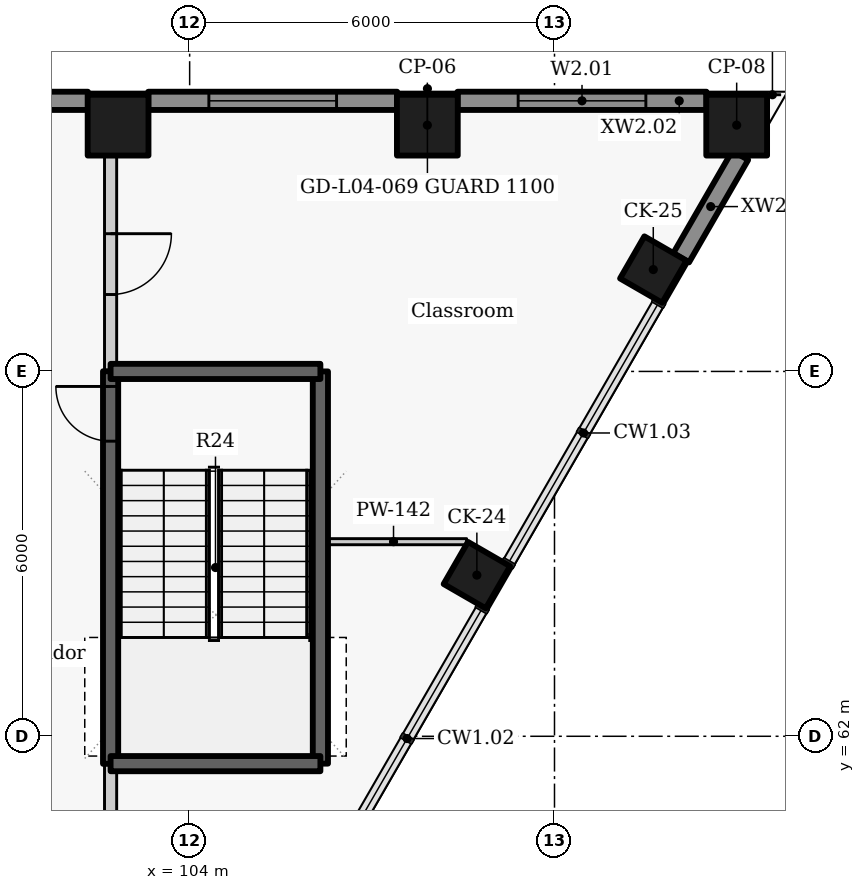
"""IFC4 building model, lengths in metres.
Left out: names, types, materials, properties, quantities, classifications, styles, units other than length and angle.
Written with IfcOpenShell. Run it as: python <this file> out.ifc"""

import sys

from ifc_helpers import new_model, si_unit, direction, frame, frame_2d, origin, origin_2d, place, context, subcontext, project, spatial, rectangle, extrude, element, fill, save


model = new_model("IFC4")
c1 = context("Model", 3, precision=1e-05, world=origin(), true_north=direction((0.0, 1.0)))
c2 = subcontext(c1, "Body", "Model", "MODEL_VIEW")
j1 = project(units=[si_unit("LENGTHUNIT", "METRE"), si_unit("PLANEANGLEUNIT", "RADIAN")], contexts=[c1])
p1 = place(None, origin())
s1 = spatial("IfcSite", under=j1, at=p1, CompositionType="ELEMENT")
p2 = place(p1, origin())
s2 = spatial("IfcBuilding", under=s1, at=p2, CompositionType="ELEMENT")
p3 = place(p2, frame((0.0, 0.0, 19.8)))
s3 = spatial("IfcBuildingStorey", under=s2, at=p3, CompositionType="ELEMENT", Elevation=19.8)
for number, where, z_axis, x_axis in (
    (1, (108.723, 64.65, 0.0), (0.0, 0.0, 1.0), (0.5, 0.866, 0.0)),
    (2, (111.625, 69.675, 0.0), (0.0, 0.0, 1.0), (0.5, 0.866, 0.0)),
):
    element("IfcColumn", number, at=place(p3, frame(where, z_axis=z_axis, x_axis=x_axis)), inside=s3, PredefinedType="COLUMN", context=c2, shape_type="SweptSolid", body=[
        extrude(rectangle(XDim=0.8, YDim=0.8, at=origin_2d()), origin(), (0.0, 0.0, 1.0), 4.2),
    ])
for number, where, z_axis, x_axis in (
    (3, (102.823, 72.05, 0.0), (0.0, 0.0, 1.0), (1.0, 0.0, 0.0)),
    (4, (107.909, 72.05, 0.0), (0.0, 0.0, 1.0), (1.0, 0.0, 0.0)),
    (5, (112.996, 72.05, 0.0), (0.0, 0.0, 1.0), (1.0, 0.0, 0.0)),
):
    element("IfcColumn", number, at=place(p3, frame(where, z_axis=z_axis, x_axis=x_axis)), inside=s3, PredefinedType="COLUMN", context=c2, shape_type="SweptSolid", body=[
        extrude(rectangle(XDim=1.0, YDim=1.0, at=origin_2d()), origin(), (0.0, 0.0, 1.0), 4.2),
    ])
p4 = place(p3, frame((112.082, 69.868, 0.0), z_axis=(0.0, 0.0, 1.0), x_axis=(0.500051850797, 0.865995465643, 0.0)))
e6 = element("IfcWall", 6, at=p4, inside=s3, PredefinedType="SOLIDWALL", context=c2, shape_type="SweptSolid", body=[
    extrude(rectangle(XDim=1.946, YDim=0.3, at=frame_2d((0.973, 0.0))), origin(), (0.0, 0.0, 1.0), 3.0),
])
p5 = place(p3, frame((112.5, 72.45, 0.0), z_axis=(0.0, 0.0, 1.0), x_axis=(-1.0, 0.0, 0.0)))
e7 = element("IfcWall", 7, at=p5, inside=s3, PredefinedType="SOLIDWALL", context=c2, shape_type="SweptSolid", body=[
    extrude(rectangle(XDim=4.095, YDim=0.3, at=frame_2d((2.047, 0.0))), origin(), (0.0, 0.0, 1.0), 3.0),
])
p6 = place(p5, frame((0.998, 0.0, 0.9)))
e8 = element("IfcOpeningElement", 8, at=p6, cuts=e7, PredefinedType="OPENING", context=c2, shape_type="SweptSolid", body=[
    extrude(rectangle(XDim=2.1, YDim=2.05, at=frame_2d((1.05, 1.025))), frame((0.0, 0.16, 0.0), z_axis=(0.0, -1.0, 0.0), x_axis=(1.0, 0.0, 0.0)), (0.0, 0.0, 1.0), 0.32),
])
p7 = place(p3, frame((107.413, 72.45, 0.0), z_axis=(0.0, 0.0, 1.0), x_axis=(-1.0, 0.0, 0.0)))
e9 = element("IfcWall", 9, at=p7, inside=s3, PredefinedType="SOLIDWALL", context=c2, shape_type="SweptSolid", body=[
    extrude(rectangle(XDim=4.094, YDim=0.3, at=frame_2d((2.047, 0.0))), origin(), (0.0, 0.0, 1.0), 3.0),
])
p8 = place(p7, frame((0.997, 0.0, 0.9)))
e10 = element("IfcOpeningElement", 10, at=p8, cuts=e9, PredefinedType="OPENING", context=c2, shape_type="SweptSolid", body=[
    extrude(rectangle(XDim=2.1, YDim=2.05, at=frame_2d((1.05, 1.025))), frame((0.0, 0.16, 0.0), z_axis=(0.0, -1.0, 0.0), x_axis=(1.0, 0.0, 0.0)), (0.0, 0.0, 1.0), 0.32),
])
p9 = place(p3, frame((102.327, 72.45, 0.0), z_axis=(0.0, 0.0, 1.0), x_axis=(-1.0, 0.0, 0.0)))
e11 = element("IfcWall", 11, at=p9, inside=s3, PredefinedType="SOLIDWALL", context=c2, shape_type="SweptSolid", body=[
    extrude(rectangle(XDim=3.973, YDim=0.3, at=frame_2d((1.986, 0.0))), origin(), (0.0, 0.0, 1.0), 3.0),
])
p10 = place(p9, frame((2.138, 0.0, 0.9)))
e12 = element("IfcOpeningElement", 12, at=p10, cuts=e11, PredefinedType="OPENING", context=c2, shape_type="SweptSolid", body=[
    extrude(rectangle(XDim=1.5, YDim=2.05, at=frame_2d((0.75, 1.025))), frame((0.0, 0.16, 0.0), z_axis=(0.0, -1.0, 0.0), x_axis=(1.0, 0.0, 0.0)), (0.0, 0.0, 1.0), 0.32),
])
p11 = place(p3, frame((102.7, 61.547, -0.3), z_axis=(0.0, 0.0, 1.0), x_axis=(0.0, 1.0, 0.0)))
e13 = element("IfcWall", 13, at=p11, inside=s3, PredefinedType="SHEAR", context=c2, shape_type="SweptSolid", body=[
    extrude(rectangle(XDim=6.456, YDim=0.25, at=frame_2d((3.228, 0.0))), origin(), (0.0, 0.0, 1.0), 4.2),
])
p12 = place(p11, frame((5.306, 0.0, 0.3)))
e14 = element("IfcOpeningElement", 14, at=p12, cuts=e13, PredefinedType="OPENING", context=c2, shape_type="SweptSolid", body=[
    extrude(rectangle(XDim=0.9, YDim=2.1, at=frame_2d((0.45, 1.05))), frame((0.0, 0.135, 0.0), z_axis=(0.0, -1.0, 0.0), x_axis=(1.0, 0.0, 0.0)), (0.0, 0.0, 1.0), 0.27),
])
p13 = place(p3, frame((102.7, 61.553, 0.0), z_axis=(0.0, 0.0, 1.0), x_axis=(0.0, -1.0, 0.0)))
e15 = element("IfcWall", 15, at=p13, inside=s3, PredefinedType="PARTITIONING", context=c2, shape_type="SweptSolid", body=[
    extrude(rectangle(XDim=6.499, YDim=0.2, at=frame_2d((3.249, 0.0))), origin(), (0.0, 0.0, 1.0), 3.9),
])
p14 = place(p13, frame((2.75, 0.0, 0.0)))
e16 = element("IfcOpeningElement", 16, at=p14, cuts=e15, PredefinedType="OPENING", context=c2, shape_type="SweptSolid", body=[
    extrude(rectangle(XDim=1.0, YDim=2.1, at=frame_2d((0.5, 1.05))), frame((0.0, 0.11, 0.0), z_axis=(0.0, -1.0, 0.0), x_axis=(1.0, 0.0, 0.0)), (0.0, 0.0, 1.0), 0.22),
])
p15 = place(p3, frame((102.7, 71.533, 0.0), z_axis=(0.0, 0.0, 1.0), x_axis=(0.0, -1.0, 0.0)))
e17 = element("IfcWall", 17, at=p15, inside=s3, PredefinedType="PARTITIONING", context=c2, shape_type="SweptSolid", body=[
    extrude(rectangle(XDim=3.536, YDim=0.2, at=frame_2d((1.768, 0.0))), origin(), (0.0, 0.0, 1.0), 3.9),
])
p16 = place(p15, frame((1.268, 0.0, 0.0)))
e18 = element("IfcOpeningElement", 18, at=p16, cuts=e17, PredefinedType="OPENING", context=c2, shape_type="SweptSolid", body=[
    extrude(rectangle(XDim=1.0, YDim=2.1, at=frame_2d((0.5, 1.05))), frame((0.0, 0.11, 0.0), z_axis=(0.0, -1.0, 0.0), x_axis=(1.0, 0.0, 0.0)), (0.0, 0.0, 1.0), 0.22),
])
p17 = place(p3, frame((106.15, 61.55, -0.3), z_axis=(0.0, 0.0, 1.0), x_axis=(0.0, 1.0, 0.0)))
e19 = element("IfcWall", 19, at=p17, inside=s3, PredefinedType="SHEAR", context=c2, shape_type="SweptSolid", body=[
    extrude(rectangle(XDim=6.45, YDim=0.25, at=frame_2d((3.225, 0.0))), origin(), (0.0, 0.0, 1.0), 4.2),
])
for number, where, z_axis, x_axis in (
    (20, (102.7, 68.0, -0.3), (0.0, 0.0, 1.0), (1.0, 0.0, 0.0)),
    (21, (102.7, 61.55, -0.3), (0.0, 0.0, 1.0), (1.0, 0.0, 0.0)),
):
    element("IfcWall", number, at=place(p3, frame(where, z_axis=z_axis, x_axis=x_axis)), inside=s3, PredefinedType="SHEAR", context=c2, shape_type="SweptSolid", body=[
        extrude(rectangle(XDim=3.45, YDim=0.25, at=frame_2d((1.725, 0.0))), origin(), (0.0, 0.0, 1.0), 4.2),
    ])
p18 = place(p3, frame((106.15, 65.2, 0.0), z_axis=(0.0, 0.0, 1.0), x_axis=(1.0, 0.0, 0.0)))
e22 = element("IfcWall", 22, at=p18, inside=s3, PredefinedType="PARTITIONING", context=c2, shape_type="SweptSolid", body=[
    extrude(rectangle(XDim=2.406, YDim=0.1, at=frame_2d((1.203, 0.0))), origin(), (0.0, 0.0, 1.0), 3.9),
])
p19 = place(p6, origin())
e23 = element("IfcWindow", 23, at=p19, inside=s3, PartitioningType="SINGLE_PANEL", PredefinedType="WINDOW", context=c2, shape_type="SweptSolid", body=[
    extrude(rectangle(XDim=2.1, YDim=2.05, at=frame_2d((1.05, 1.025))), frame((0.0, 0.03, 0.0), z_axis=(0.0, -1.0, 0.0), x_axis=(1.0, 0.0, 0.0)), (0.0, 0.0, 1.0), 0.06),
])
fill(e8, e23)
p20 = place(p8, origin())
e24 = element("IfcWindow", 24, at=p20, inside=s3, PartitioningType="SINGLE_PANEL", PredefinedType="WINDOW", context=c2, shape_type="SweptSolid", body=[
    extrude(rectangle(XDim=2.1, YDim=2.05, at=frame_2d((1.05, 1.025))), frame((0.0, 0.03, 0.0), z_axis=(0.0, -1.0, 0.0), x_axis=(1.0, 0.0, 0.0)), (0.0, 0.0, 1.0), 0.06),
])
fill(e10, e24)
p21 = place(p12, origin())
e25 = element("IfcDoor", 25, at=p21, inside=s3, OperationType="SINGLE_SWING_RIGHT", PredefinedType="DOOR", context=c2, shape_type="SweptSolid", body=[
    extrude(rectangle(XDim=0.9, YDim=2.1, at=frame_2d((0.45, 1.05))), frame((0.0, 0.025, 0.0), z_axis=(0.0, -1.0, 0.0), x_axis=(1.0, 0.0, 0.0)), (0.0, 0.0, 1.0), 0.05),
])
fill(e14, e25)
p22 = place(p16, origin())
e26 = element("IfcDoor", 26, at=p22, inside=s3, OperationType="SINGLE_SWING_LEFT", PredefinedType="DOOR", context=c2, shape_type="SweptSolid", body=[
    extrude(rectangle(XDim=1.0, YDim=2.1, at=frame_2d((0.5, 1.05))), frame((0.0, 0.025, 0.0), z_axis=(0.0, -1.0, 0.0), x_axis=(1.0, 0.0, 0.0)), (0.0, 0.0, 1.0), 0.05),
])
fill(e18, e26)
save(model, sys.argv[1])
